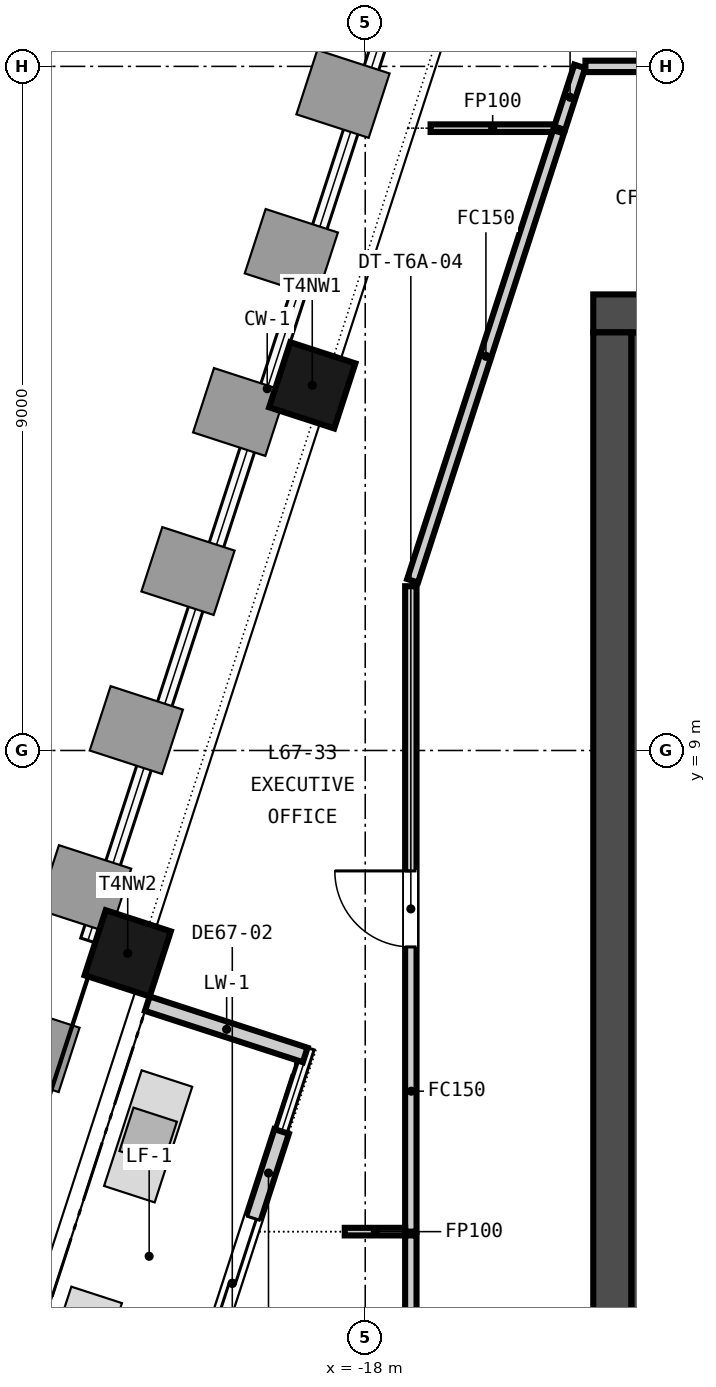
"""IFC4 building model, lengths in metres.
Left out: names, types, materials, properties, quantities, classifications, styles, units other than length and angle.
Written with IfcOpenShell. Run it as: python <this file> out.ifc"""

import sys

from ifc_helpers import new_model, si_unit, direction, frame, frame_2d, origin, origin_2d, place, context, subcontext, project, spatial, rectangle, extrude, element, fill, save


model = new_model("IFC4")
c1 = context("Model", 3, precision=1e-05, world=origin(), true_north=direction((0.0, 1.0)))
c2 = subcontext(c1, "Body", "Model", "MODEL_VIEW")
j1 = project(units=[si_unit("LENGTHUNIT", "METRE"), si_unit("PLANEANGLEUNIT", "RADIAN")], contexts=[c1])
p1 = place(None, origin())
s1 = spatial("IfcSite", under=j1, at=p1, CompositionType="ELEMENT")
p2 = place(p1, origin())
s2 = spatial("IfcBuilding", under=s1, at=p2, CompositionType="ELEMENT")
p3 = place(p2, frame((0.0, 0.0, 264.6)))
s3 = spatial("IfcBuildingStorey", under=s2, at=p3, CompositionType="ELEMENT", Elevation=264.6)
p4 = place(p3, frame((-15.0, 14.75, -0.15), z_axis=(0.0, 0.0, 1.0), x_axis=(1.0, 0.0, 0.0)))
e1 = element("IfcWall", 1, at=p4, inside=s3, PredefinedType="SOLIDWALL", context=c2, shape_type="SweptSolid", body=[
    extrude(rectangle(XDim=30.0, YDim=0.5, at=frame_2d((15.0, 0.0))), origin(), (0.0, 0.0, 1.0), 3.65),
])
p5 = place(p4, frame((9.25, 0.0, 0.15)))
e2 = element("IfcOpeningElement", 2, at=p5, cuts=e1, PredefinedType="OPENING", context=c2, shape_type="SweptSolid", body=[
    extrude(rectangle(XDim=1.5, YDim=2.1, at=frame_2d((0.75, 1.05))), frame((0.0, 0.26, 0.0), z_axis=(0.0, -1.0, 0.0), x_axis=(1.0, 0.0, 0.0)), (0.0, 0.0, 1.0), 0.52),
])
p6 = place(p4, frame((19.4, 0.0, 0.15)))
e3 = element("IfcOpeningElement", 3, at=p6, cuts=e1, PredefinedType="OPENING", context=c2, shape_type="SweptSolid", body=[
    extrude(rectangle(XDim=1.5, YDim=2.1, at=frame_2d((0.75, 1.05))), frame((0.0, 0.26, 0.0), z_axis=(0.0, -1.0, 0.0), x_axis=(1.0, 0.0, 0.0)), (0.0, 0.0, 1.0), 0.52),
])
p7 = place(p4, frame((1.5, 0.0, 0.15)))
e4 = element("IfcOpeningElement", 4, at=p7, cuts=e1, PredefinedType="OPENING", context=c2, shape_type="SweptSolid", body=[
    extrude(rectangle(XDim=1.2, YDim=2.1, at=frame_2d((0.6, 1.05))), frame((0.0, 0.26, 0.0), z_axis=(0.0, -1.0, 0.0), x_axis=(1.0, 0.0, 0.0)), (0.0, 0.0, 1.0), 0.52),
])
p8 = place(p4, frame((27.3, 0.0, 0.15)))
e5 = element("IfcOpeningElement", 5, at=p8, cuts=e1, PredefinedType="OPENING", context=c2, shape_type="SweptSolid", body=[
    extrude(rectangle(XDim=1.2, YDim=2.1, at=frame_2d((0.6, 1.05))), frame((0.0, 0.26, 0.0), z_axis=(0.0, -1.0, 0.0), x_axis=(1.0, 0.0, 0.0)), (0.0, 0.0, 1.0), 0.52),
])
p9 = place(p3, frame((-14.75, 0.5, -0.15), z_axis=(0.0, 0.0, 1.0), x_axis=(0.0, 1.0, 0.0)))
e6 = element("IfcWall", 6, at=p9, inside=s3, PredefinedType="SOLIDWALL", context=c2, shape_type="SweptSolid", body=[
    extrude(rectangle(XDim=14.0, YDim=0.5, at=frame_2d((7.0, 0.0))), origin(), (0.0, 0.0, 1.0), 3.65),
])
for number, where, z_axis, x_axis in (
    (7, (-18.697, 13.804, -0.15), (0.0, 0.0, 1.0), (-0.309, -0.951, 0.0)),
    (8, (-21.125, 6.331, -0.15), (0.0, 0.0, 1.0), (-0.309, -0.951, 0.0)),
):
    element("IfcColumn", number, at=place(p3, frame(where, z_axis=z_axis, x_axis=x_axis)), inside=s3, PredefinedType="COLUMN", context=c2, shape_type="SweptSolid", body=[
        extrude(rectangle(XDim=0.9, YDim=0.9, at=origin_2d()), origin(), (0.0, 0.0, 1.0), 3.65),
    ])
p10 = place(p3, frame((-19.1, 3.988, 0.0), z_axis=(0.0, 0.0, 1.0), x_axis=(-0.30901640812, -0.951056706781, 0.0)))
e9 = element("IfcWall", 9, at=p10, inside=s3, PredefinedType="SOLIDWALL", context=c2, shape_type="SweptSolid", body=[
    extrude(rectangle(XDim=4.2, YDim=0.2, at=frame_2d((2.1, 0.0))), origin(), (0.0, 0.0, 1.0), 2.897),
])
p11 = place(p10, frame((1.2, 0.0, 0.0)))
e10 = element("IfcOpeningElement", 10, at=p11, cuts=e9, PredefinedType="OPENING", context=c2, shape_type="SweptSolid", body=[
    extrude(rectangle(XDim=1.8, YDim=2.4, at=frame_2d((0.9, 1.2))), frame((0.0, 0.11, 0.0), z_axis=(0.0, -1.0, 0.0), x_axis=(1.0, 0.0, 0.0)), (0.0, 0.0, 1.0), 0.22),
])
p12 = place(p3, frame((-20.867, 5.669, 0.0), z_axis=(0.0, 0.0, 1.0), x_axis=(0.951059534302, -0.30900770575, 0.0)))
e11 = element("IfcWall", 11, at=p12, inside=s3, PredefinedType="SOLIDWALL", context=c2, shape_type="SweptSolid", body=[
    extrude(rectangle(XDim=2.184, YDim=0.2, at=frame_2d((1.092, 0.0))), origin(), (0.0, 0.0, 1.0), 3.05),
])
p13 = place(p3, frame((-14.25, 0.5, 0.0), z_axis=(0.0, 0.0, 1.0), x_axis=(0.0, 1.0, 0.0)))
e12 = element("IfcWall", 12, at=p13, inside=s3, PredefinedType="SOLIDWALL", context=c2, shape_type="SweptSolid", body=[
    extrude(rectangle(XDim=14.0, YDim=0.5, at=frame_2d((7.0, 0.0))), origin(), (0.0, 0.0, 1.0), 3.5),
])
p14 = place(p3, frame((-15.442, 17.187, 0.0), z_axis=(0.0, 0.0, 1.0), x_axis=(0.308763129345, 0.951138964588, 0.0)))
e13 = element("IfcWall", 13, at=p14, inside=s3, PredefinedType="PARTITIONING", context=c2, shape_type="SweptSolid", body=[
    extrude(rectangle(XDim=0.855, YDim=0.15, at=frame_2d((0.427, 0.0))), origin(), (0.0, 0.0, 1.0), 2.75),
])
p15 = place(p3, frame((-15.103, 18.0, 0.0), z_axis=(0.0, 0.0, 1.0), x_axis=(1.0, 0.0, 0.0)))
e14 = element("IfcWall", 14, at=p15, inside=s3, PredefinedType="PARTITIONING", context=c2, shape_type="SweptSolid", body=[
    extrude(rectangle(XDim=14.928, YDim=0.15, at=frame_2d((7.464, 0.0))), origin(), (0.0, 0.0, 1.0), 2.75),
])
p16 = place(p15, frame((6.964, 0.0, 0.0)))
e15 = element("IfcOpeningElement", 15, at=p16, cuts=e14, PredefinedType="OPENING", context=c2, shape_type="SweptSolid", body=[
    extrude(rectangle(XDim=1.0, YDim=2.1, at=frame_2d((0.5, 1.05))), frame((0.0, 0.085, 0.0), z_axis=(0.0, -1.0, 0.0), x_axis=(1.0, 0.0, 0.0)), (0.0, 0.0, 1.0), 0.17),
])
p17 = place(p3, frame((-17.14, 17.187, 0.0), z_axis=(0.0, 0.0, 1.0), x_axis=(1.0, 0.0, 0.0)))
e16 = element("IfcWall", 16, at=p17, inside=s3, PredefinedType="PARTITIONING", context=c2, shape_type="SweptSolid", body=[
    extrude(rectangle(XDim=1.623, YDim=0.1, at=frame_2d((0.812, 0.0))), origin(), (0.0, 0.0, 1.0), 2.75),
])
p18 = place(p3, frame((-17.4, 2.67, 0.0), z_axis=(0.0, 0.0, 1.0), x_axis=(0.0, 1.0, 0.0)))
e17 = element("IfcWall", 17, at=p18, inside=s3, PredefinedType="PARTITIONING", context=c2, shape_type="SweptSolid", body=[
    extrude(rectangle(XDim=8.491, YDim=0.15, at=frame_2d((4.246, 0.0))), origin(), (0.0, 0.0, 1.0), 2.75),
])
p19 = place(p18, frame((3.746, 0.0, 0.0)))
e18 = element("IfcOpeningElement", 18, at=p19, cuts=e17, PredefinedType="OPENING", context=c2, shape_type="SweptSolid", body=[
    extrude(rectangle(XDim=1.0, YDim=2.1, at=frame_2d((0.5, 1.05))), frame((0.0, 0.085, 0.0), z_axis=(0.0, -1.0, 0.0), x_axis=(1.0, 0.0, 0.0)), (0.0, 0.0, 1.0), 0.17),
])
p20 = place(p3, frame((-17.377, 11.232, 0.0), z_axis=(0.0, 0.0, 1.0), x_axis=(0.309001632963, 0.951061507383, 0.0)))
e19 = element("IfcWall", 19, at=p20, inside=s3, PredefinedType="PARTITIONING", context=c2, shape_type="SweptSolid", body=[
    extrude(rectangle(XDim=6.211, YDim=0.15, at=frame_2d((3.105, 0.0))), origin(), (0.0, 0.0, 1.0), 2.75),
])
p21 = place(p3, frame((-18.269, 2.67, 0.0), z_axis=(0.0, 0.0, 1.0), x_axis=(1.0, 0.0, 0.0)))
e20 = element("IfcWall", 20, at=p21, inside=s3, PredefinedType="PARTITIONING", context=c2, shape_type="SweptSolid", body=[
    extrude(rectangle(XDim=0.794, YDim=0.1, at=frame_2d((0.397, 0.0))), origin(), (0.0, 0.0, 1.0), 2.75),
])
p22 = place(p3, frame((-17.4, -2.925, 0.0), z_axis=(0.0, 0.0, 1.0), x_axis=(0.0, 1.0, 0.0)))
e21 = element("IfcWall", 21, at=p22, inside=s3, PredefinedType="PARTITIONING", context=c2, shape_type="SweptSolid", body=[
    extrude(rectangle(XDim=5.545, YDim=0.15, at=frame_2d((2.772, 0.0))), origin(), (0.0, 0.0, 1.0), 2.75),
])
p23 = place(p22, frame((1.873, 0.0, 0.0)))
e22 = element("IfcOpeningElement", 22, at=p23, cuts=e21, PredefinedType="OPENING", context=c2, shape_type="SweptSolid", body=[
    extrude(rectangle(XDim=1.8, YDim=2.1, at=frame_2d((0.9, 1.05))), frame((0.0, 0.085, 0.0), z_axis=(0.0, -1.0, 0.0), x_axis=(1.0, 0.0, 0.0)), (0.0, 0.0, 1.0), 0.17),
])
p24 = place(p11, origin())
e23 = element("IfcDoor", 23, at=p24, inside=s3, OperationType="SINGLE_SWING_LEFT", PredefinedType="DOOR", context=c2, shape_type="SweptSolid", body=[
    extrude(rectangle(XDim=1.8, YDim=2.4, at=frame_2d((0.9, 1.2))), frame((0.0, 0.025, 0.0), z_axis=(0.0, -1.0, 0.0), x_axis=(1.0, 0.0, 0.0)), (0.0, 0.0, 1.0), 0.05),
])
fill(e10, e23)
p25 = place(p19, origin())
e24 = element("IfcDoor", 24, at=p25, inside=s3, OperationType="SINGLE_SWING_RIGHT", PredefinedType="DOOR", context=c2, shape_type="SweptSolid", body=[
    extrude(rectangle(XDim=1.0, YDim=2.1, at=frame_2d((0.5, 1.05))), frame((0.0, 0.025, 0.0), z_axis=(0.0, -1.0, 0.0), x_axis=(1.0, 0.0, 0.0)), (0.0, 0.0, 1.0), 0.05),
])
fill(e18, e24)
save(model, sys.argv[1])
